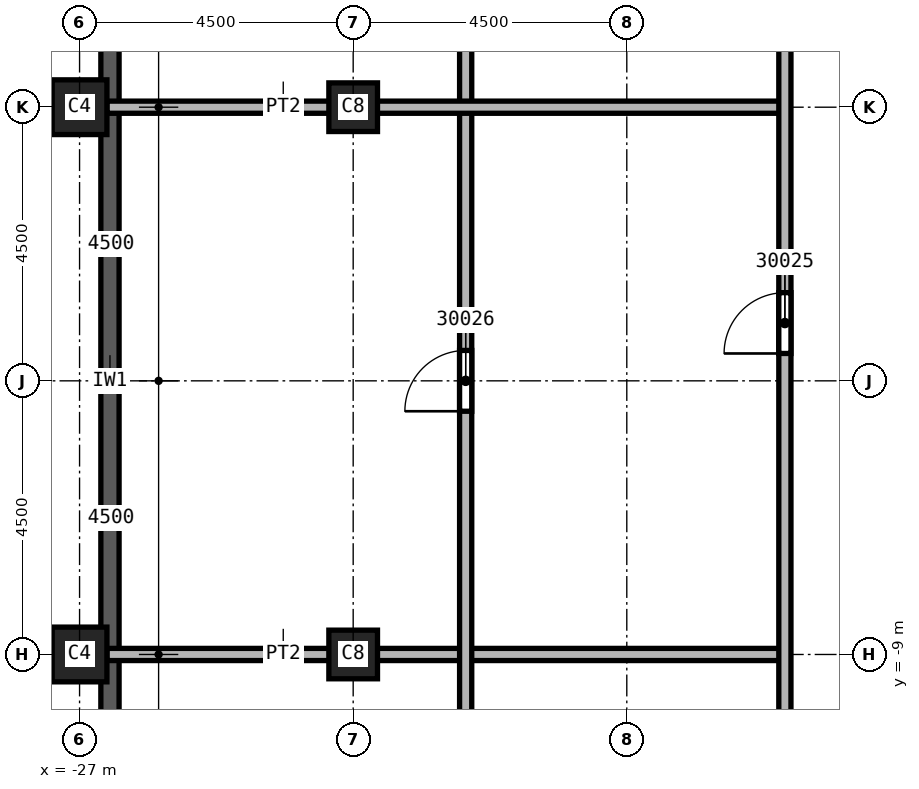
"""IFC4 building model, lengths in metres.
Left out: names, types, materials, properties, quantities, classifications, styles, units other than length and angle.
Written with IfcOpenShell. Run it as: python <this file> out.ifc"""

import sys

from ifc_helpers import new_model, si_unit, direction, frame, frame_2d, origin, origin_2d, place, context, subcontext, project, spatial, rectangle, extrude, element, fill, save


model = new_model("IFC4")
c1 = context("Model", 3, precision=1e-05, world=origin(), true_north=direction((0.0, 1.0)))
c2 = subcontext(c1, "Body", "Model", "MODEL_VIEW")
j1 = project(units=[si_unit("LENGTHUNIT", "METRE"), si_unit("PLANEANGLEUNIT", "RADIAN")], contexts=[c1])
p1 = place(None, origin())
s1 = spatial("IfcSite", under=j1, at=p1, CompositionType="ELEMENT")
p2 = place(p1, origin())
s2 = spatial("IfcBuilding", under=s1, at=p2, CompositionType="ELEMENT")
p3 = place(p2, frame((0.0, 0.0, 320.0)))
s3 = spatial("IfcBuildingStorey", under=s2, at=p3, CompositionType="ELEMENT", Elevation=320.0)
for number, where, z_axis, x_axis in (
    (1, (-22.5, 0.0, 0.0), (0.0, 0.0, 1.0), (1.0, 0.0, 0.0)),
    (2, (-22.5, -9.0, 0.0), (0.0, 0.0, 1.0), (1.0, 0.0, 0.0)),
):
    element("IfcColumn", number, at=place(p3, frame(where, z_axis=z_axis, x_axis=x_axis)), inside=s3, PredefinedType="COLUMN", context=c2, shape_type="SweptSolid", body=[
        extrude(rectangle(XDim=0.8, YDim=0.8, at=origin_2d()), origin(), (0.0, 0.0, 1.0), 5.74),
    ])
for number, where, z_axis, x_axis in (
    (3, (-27.0, 0.0, 0.0), (0.0, 0.0, 1.0), (0.0, 1.0, 0.0)),
    (4, (-27.0, -9.0, 0.0), (0.0, 0.0, 1.0), (0.0, 1.0, 0.0)),
):
    element("IfcColumn", number, at=place(p3, frame(where, z_axis=z_axis, x_axis=x_axis)), inside=s3, PredefinedType="COLUMN", context=c2, shape_type="SweptSolid", body=[
        extrude(rectangle(XDim=0.9, YDim=0.9, at=origin_2d()), origin(), (0.0, 0.0, 1.0), 5.74),
    ])
p4 = place(p3, frame((-26.5, 8.55, 0.0), z_axis=(0.0, 0.0, 1.0), x_axis=(0.0, -1.0, 0.0)))
e5 = element("IfcWall", 5, at=p4, inside=s3, PredefinedType="SOLIDWALL", context=c2, shape_type="SweptSolid", body=[
    extrude(rectangle(XDim=8.5, YDim=0.3, at=frame_2d((4.25, 0.0))), origin(), (0.0, 0.0, 1.0), 5.14),
])
p5 = place(p3, frame((-26.5, -0.05, 0.0), z_axis=(0.0, 0.0, 1.0), x_axis=(0.0, -1.0, 0.0)))
e6 = element("IfcWall", 6, at=p5, inside=s3, PredefinedType="SOLIDWALL", context=c2, shape_type="SweptSolid", body=[
    extrude(rectangle(XDim=8.9, YDim=0.3, at=frame_2d((4.45, 0.0))), origin(), (0.0, 0.0, 1.0), 5.14),
])
p6 = place(p3, frame((-26.5, -9.05, 0.0), z_axis=(0.0, 0.0, 1.0), x_axis=(0.0, -1.0, 0.0)))
e7 = element("IfcWall", 7, at=p6, inside=s3, PredefinedType="SOLIDWALL", context=c2, shape_type="SweptSolid", body=[
    extrude(rectangle(XDim=8.5, YDim=0.3, at=frame_2d((4.25, 0.0))), origin(), (0.0, 0.0, 1.0), 5.14),
])
p7 = place(p3, frame((-26.55, -9.0, 0.0), z_axis=(0.0, 0.0, 1.0), x_axis=(1.0, 0.0, 0.0)))
e8 = element("IfcWall", 8, at=p7, inside=s3, PredefinedType="PARTITIONING", context=c2, shape_type="SweptSolid", body=[
    extrude(rectangle(XDim=11.15, YDim=0.2, at=frame_2d((5.575, 0.0))), origin(), (0.0, 0.0, 1.0), 5.74),
])
p8 = place(p3, frame((-20.65, -22.75, 0.0), z_axis=(0.0, 0.0, 1.0), x_axis=(0.0, 1.0, 0.0)))
e9 = element("IfcWall", 9, at=p8, inside=s3, PredefinedType="PARTITIONING", context=c2, shape_type="SweptSolid", body=[
    extrude(rectangle(XDim=36.25, YDim=0.2, at=frame_2d((18.125, 0.0))), origin(), (0.0, 0.0, 1.0), 5.74),
])
p9 = place(p8, frame((26.2, 0.0, 0.0)))
e10 = element("IfcOpeningElement", 10, at=p9, cuts=e9, PredefinedType="OPENING", context=c2, shape_type="SweptSolid", body=[
    extrude(rectangle(XDim=1.0, YDim=2.1, at=frame_2d((0.5, 1.05))), frame((0.0, 0.1, 0.0), z_axis=(0.0, -1.0, 0.0), x_axis=(1.0, 0.0, 0.0)), (0.0, 0.0, 1.0), 0.2),
])
p10 = place(p8, frame((8.2, 0.0, 0.0)))
e11 = element("IfcOpeningElement", 11, at=p10, cuts=e9, PredefinedType="OPENING", context=c2, shape_type="SweptSolid", body=[
    extrude(rectangle(XDim=1.0, YDim=2.1, at=frame_2d((0.5, 1.05))), frame((0.0, 0.1, 0.0), z_axis=(0.0, -1.0, 0.0), x_axis=(1.0, 0.0, 0.0)), (0.0, 0.0, 1.0), 0.2),
])
p11 = place(p8, frame((17.75, 0.0, 0.0)))
e12 = element("IfcOpeningElement", 12, at=p11, cuts=e9, PredefinedType="OPENING", context=c2, shape_type="SweptSolid", body=[
    extrude(rectangle(XDim=1.0, YDim=2.1, at=frame_2d((0.5, 1.05))), frame((0.0, 0.1, 0.0), z_axis=(0.0, -1.0, 0.0), x_axis=(1.0, 0.0, 0.0)), (0.0, 0.0, 1.0), 0.2),
])
p12 = place(p3, frame((-15.4, 0.0, 0.0), z_axis=(0.0, 0.0, 1.0), x_axis=(-1.0, 0.0, 0.0)))
e13 = element("IfcWall", 13, at=p12, inside=s3, PredefinedType="PARTITIONING", context=c2, shape_type="SweptSolid", body=[
    extrude(rectangle(XDim=11.15, YDim=0.2, at=frame_2d((5.575, 0.0))), origin(), (0.0, 0.0, 1.0), 5.74),
])
p13 = place(p3, frame((-15.4, -22.75, 0.0), z_axis=(0.0, 0.0, 1.0), x_axis=(0.0, 1.0, 0.0)))
e14 = element("IfcWall", 14, at=p13, inside=s3, PredefinedType="PARTITIONING", context=c2, shape_type="SweptSolid", body=[
    extrude(rectangle(XDim=36.35, YDim=0.2, at=frame_2d((18.175, 0.0))), origin(), (0.0, 0.0, 1.0), 5.74),
])
p14 = place(p13, frame((27.25, 0.0, 0.0)))
e15 = element("IfcOpeningElement", 15, at=p14, cuts=e14, PredefinedType="OPENING", context=c2, shape_type="SweptSolid", body=[
    extrude(rectangle(XDim=1.0, YDim=2.1, at=frame_2d((0.5, 1.05))), frame((0.0, 0.1, 0.0), z_axis=(0.0, -1.0, 0.0), x_axis=(1.0, 0.0, 0.0)), (0.0, 0.0, 1.0), 0.2),
])
p15 = place(p13, frame((9.1, 0.0, 0.0)))
e16 = element("IfcOpeningElement", 16, at=p15, cuts=e14, PredefinedType="OPENING", context=c2, shape_type="SweptSolid", body=[
    extrude(rectangle(XDim=1.0, YDim=2.1, at=frame_2d((0.5, 1.05))), frame((0.0, 0.1, 0.0), z_axis=(0.0, -1.0, 0.0), x_axis=(1.0, 0.0, 0.0)), (0.0, 0.0, 1.0), 0.2),
])
p16 = place(p13, frame((18.7, 0.0, 0.0)))
e17 = element("IfcOpeningElement", 17, at=p16, cuts=e14, PredefinedType="OPENING", context=c2, shape_type="SweptSolid", body=[
    extrude(rectangle(XDim=1.0, YDim=2.1, at=frame_2d((0.5, 1.05))), frame((0.0, 0.1, 0.0), z_axis=(0.0, -1.0, 0.0), x_axis=(1.0, 0.0, 0.0)), (0.0, 0.0, 1.0), 0.2),
])
p17 = place(p16, origin())
e18 = element("IfcDoor", 18, at=p17, inside=s3, OperationType="SINGLE_SWING_RIGHT", PredefinedType="DOOR", context=c2, shape_type="SweptSolid", body=[
    extrude(rectangle(XDim=1.0, YDim=2.1, at=frame_2d((0.5, 1.05))), frame((0.0, 0.025, 0.0), z_axis=(0.0, -1.0, 0.0), x_axis=(1.0, 0.0, 0.0)), (0.0, 0.0, 1.0), 0.05),
])
fill(e17, e18)
p18 = place(p11, origin())
e19 = element("IfcDoor", 19, at=p18, inside=s3, OperationType="SINGLE_SWING_LEFT", PredefinedType="DOOR", context=c2, shape_type="SweptSolid", body=[
    extrude(rectangle(XDim=1.0, YDim=2.1, at=frame_2d((0.5, 1.05))), frame((0.0, 0.025, 0.0), z_axis=(0.0, -1.0, 0.0), x_axis=(1.0, 0.0, 0.0)), (0.0, 0.0, 1.0), 0.05),
])
fill(e12, e19)
save(model, sys.argv[1])
